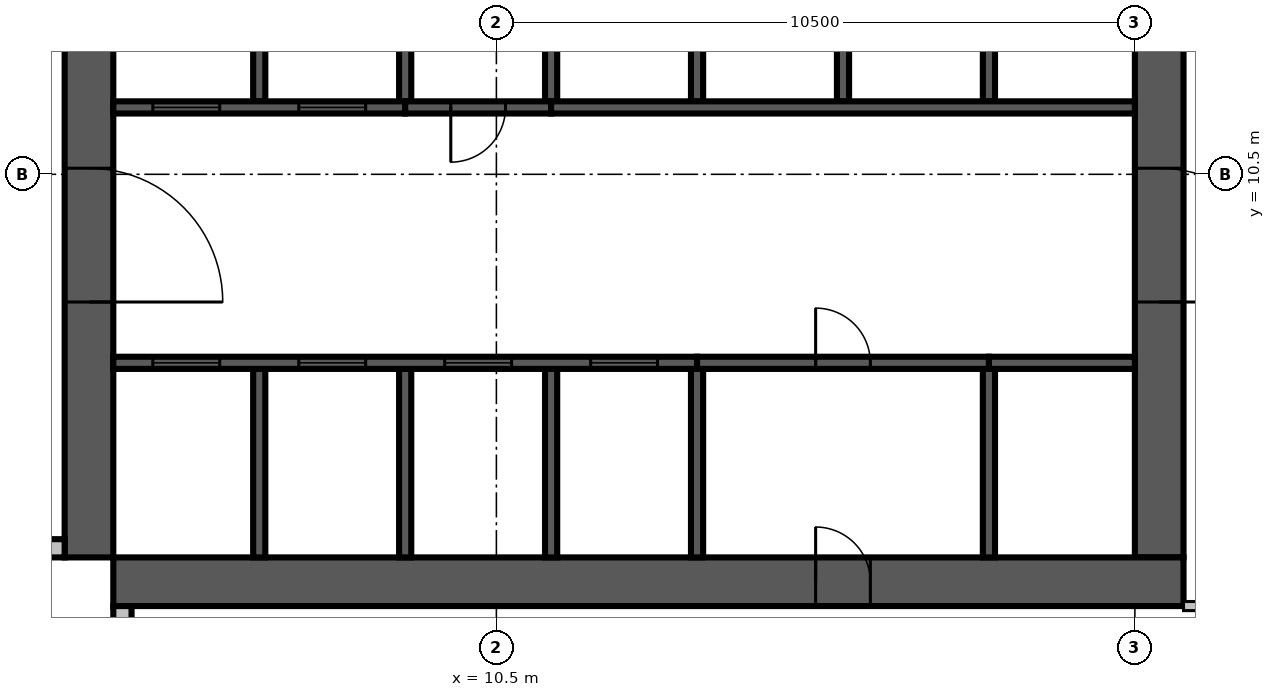
"""IFC4 building model, lengths in metres.
Left out: names, types, materials, properties, quantities, classifications, styles, units other than length and angle.
Written with IfcOpenShell. Run it as: python <this file> out.ifc"""

import sys

from ifc_helpers import new_model, si_unit, direction, frame, frame_2d, origin, place, context, subcontext, project, spatial, rectangle, extrude, source, transform, mapped, element, fill, save


model = new_model("IFC4")
c1 = context("Model", 3, precision=1e-05, world=origin(), true_north=direction((0.0, 1.0)))
c2 = subcontext(c1, "Body", "Model", "MODEL_VIEW")
j1 = project(units=[si_unit("LENGTHUNIT", "METRE"), si_unit("PLANEANGLEUNIT", "RADIAN")], contexts=[c1])
p1 = place(None, origin())
s1 = spatial("IfcSite", under=j1, at=p1, CompositionType="ELEMENT")
p2 = place(p1, origin())
s2 = spatial("IfcBuilding", under=s1, at=p2, CompositionType="ELEMENT")
p3 = place(p2, frame((0.0, 0.0, 227.2)))
s3 = spatial("IfcBuildingStorey", under=s2, at=p3, CompositionType="ELEMENT", Elevation=227.2)
m1 = source(origin(), c2, "Body", "SweptSolid", [
    extrude(rectangle(XDim=17.6, YDim=0.8, at=frame_2d((8.8, 0.0))), origin(), (0.0, 0.0, 1.0), 3.8),
])
p4 = place(p3, frame((3.8, 4.2, 0.0), z_axis=(0.0, 0.0, 1.0), x_axis=(0.0, 1.0, 0.0)))
e1 = element("IfcWall", 1, at=p4, inside=s3, PredefinedType="SHEAR", context=c2, shape_type="MappedRepresentation", body=[
    mapped(m1, transform((0.0, 0.0, 0.0), scale=1.0)),
])
m2 = source(origin(), c2, "Body", "SweptSolid", [
    extrude(rectangle(XDim=2.2, YDim=2.1, at=frame_2d((1.1, 1.05))), frame((0.0, 0.41, 0.0), z_axis=(0.0, -1.0, 0.0), x_axis=(1.0, 0.0, 0.0)), (0.0, 0.0, 1.0), 0.82),
])
p5 = place(p4, frame((4.2, 0.0, 0.0)))
e2 = element("IfcOpeningElement", 2, at=p5, cuts=e1, PredefinedType="OPENING", context=c2, shape_type="MappedRepresentation", body=[
    mapped(m2, transform((0.0, 0.0, 0.0), scale=1.0)),
])
m3 = source(origin(), c2, "Body", "SweptSolid", [
    extrude(rectangle(XDim=0.9, YDim=2.1, at=frame_2d((0.45, 1.05))), frame((0.0, 0.41, 0.0), z_axis=(0.0, -1.0, 0.0), x_axis=(1.0, 0.0, 0.0)), (0.0, 0.0, 1.0), 0.82),
])
p6 = place(p4, frame((10.95, 0.0, 0.0)))
e3 = element("IfcOpeningElement", 3, at=p6, cuts=e1, PredefinedType="OPENING", context=c2, shape_type="MappedRepresentation", body=[
    mapped(m3, transform((0.0, 0.0, 0.0), scale=1.0)),
])
m4 = source(origin(), c2, "Body", "SweptSolid", [
    extrude(rectangle(XDim=16.8, YDim=0.8, at=frame_2d((8.4, 0.0))), origin(), (0.0, 0.0, 1.0), 3.8),
])
p7 = place(p3, frame((21.4, 4.2, 0.0), z_axis=(0.0, 0.0, 1.0), x_axis=(0.0, 1.0, 0.0)))
e4 = element("IfcWall", 4, at=p7, inside=s3, PredefinedType="SHEAR", context=c2, shape_type="MappedRepresentation", body=[
    mapped(m4, transform((0.0, 0.0, 0.0), scale=1.0)),
])
p8 = place(p7, frame((4.2, 0.0, 0.0)))
e5 = element("IfcOpeningElement", 5, at=p8, cuts=e4, PredefinedType="OPENING", context=c2, shape_type="MappedRepresentation", body=[
    mapped(m2, transform((0.0, 0.0, 0.0), scale=1.0)),
])
m5 = source(origin(), c2, "Body", "SweptSolid", [
    extrude(rectangle(XDim=1.2, YDim=2.1, at=frame_2d((0.6, 1.05))), frame((0.0, 0.41, 0.0), z_axis=(0.0, -1.0, 0.0), x_axis=(1.0, 0.0, 0.0)), (0.0, 0.0, 1.0), 0.82),
])
p9 = place(p7, frame((14.7, 0.0, 0.0)))
e6 = element("IfcOpeningElement", 6, at=p9, cuts=e4, PredefinedType="OPENING", context=c2, shape_type="MappedRepresentation", body=[
    mapped(m5, transform((0.0, 0.0, 0.0), scale=1.0)),
])
p10 = place(p3, frame((4.2, 3.8, 0.0), z_axis=(0.0, 0.0, 1.0), x_axis=(1.0, 0.0, 0.0)))
e7 = element("IfcWall", 7, at=p10, inside=s3, PredefinedType="SHEAR", context=c2, shape_type="MappedRepresentation", body=[
    mapped(m1, transform((0.0, 0.0, 0.0), scale=1.0)),
])
p11 = place(p10, frame((11.55, 0.0, 0.0)))
e8 = element("IfcOpeningElement", 8, at=p11, cuts=e7, PredefinedType="OPENING", context=c2, shape_type="MappedRepresentation", body=[
    mapped(m3, transform((0.0, 0.0, 0.0), scale=1.0)),
])
m6 = source(origin(), c2, "Body", "SweptSolid", [
    extrude(rectangle(XDim=3.4, YDim=0.3, at=frame_2d((1.7, 0.0))), origin(), (0.0, 0.0, 1.0), 3.4),
])
p12 = place(p3, frame((0.0, 4.35, 0.0), z_axis=(0.0, 0.0, 1.0), x_axis=(1.0, 0.0, 0.0)))
e9 = element("IfcWall", 9, at=p12, inside=s3, PredefinedType="STANDARD", context=c2, shape_type="MappedRepresentation", body=[
    mapped(m6, transform((0.0, 0.0, 0.0), scale=1.0)),
])
m7 = source(origin(), c2, "Body", "SweptSolid", [
    extrude(rectangle(XDim=1.8, YDim=2.3, at=frame_2d((0.9, 1.15))), frame((0.0, 0.16, 0.0), z_axis=(0.0, -1.0, 0.0), x_axis=(1.0, 0.0, 0.0)), (0.0, 0.0, 1.0), 0.32),
])
p13 = place(p12, frame((1.2, 0.0, 0.6)))
e10 = element("IfcOpeningElement", 10, at=p13, cuts=e9, PredefinedType="OPENING", context=c2, shape_type="MappedRepresentation", body=[
    mapped(m7, transform((0.0, 0.0, 0.0), scale=1.0)),
])
p14 = place(p3, frame((4.35, 3.4, 0.0), z_axis=(0.0, 0.0, 1.0), x_axis=(0.0, -1.0, 0.0)))
e11 = element("IfcWall", 11, at=p14, inside=s3, PredefinedType="STANDARD", context=c2, shape_type="MappedRepresentation", body=[
    mapped(m6, transform((0.0, 0.0, 0.0), scale=1.0)),
])
p15 = place(p14, frame((0.4, 0.0, 0.6)))
e12 = element("IfcOpeningElement", 12, at=p15, cuts=e11, PredefinedType="OPENING", context=c2, shape_type="MappedRepresentation", body=[
    mapped(m7, transform((0.0, 0.0, 0.0), scale=1.0)),
])
m8 = source(origin(), c2, "Body", "SweptSolid", [
    extrude(rectangle(XDim=3.1, YDim=0.2, at=frame_2d((1.55, 0.0))), origin(), (0.0, 0.0, 1.0), 3.8),
])
for number, where, z_axis, x_axis in (
    (13, (6.6, 4.2, 0.0), (0.0, 0.0, 1.0), (0.0, 1.0, 0.0)),
    (14, (9.0, 4.2, 0.0), (0.0, 0.0, 1.0), (0.0, 1.0, 0.0)),
    (15, (11.4, 4.2, 0.0), (0.0, 0.0, 1.0), (0.0, 1.0, 0.0)),
):
    element("IfcWall", number, at=place(p3, frame(where, z_axis=z_axis, x_axis=x_axis)), inside=s3, PredefinedType="SOLIDWALL", context=c2, shape_type="MappedRepresentation", body=[
        mapped(m8, transform((0.0, 0.0, 0.0), scale=1.0)),
    ])
m9 = source(origin(), c2, "Body", "SweptSolid", [
    extrude(rectangle(XDim=3.1, YDim=0.2, at=frame_2d((1.55, 0.0))), origin(), (0.0, 0.0, 1.0), 3.4),
])
for number, where, z_axis, x_axis in (
    (16, (13.8, 4.2, 0.0), (0.0, 0.0, 1.0), (0.0, 1.0, 0.0)),
    (17, (18.6, 4.2, 0.0), (0.0, 0.0, 1.0), (0.0, 1.0, 0.0)),
):
    element("IfcWall", number, at=place(p3, frame(where, z_axis=z_axis, x_axis=x_axis)), inside=s3, PredefinedType="SOLIDWALL", context=c2, shape_type="MappedRepresentation", body=[
        mapped(m9, transform((0.0, 0.0, 0.0), scale=1.0)),
    ])
m10 = source(origin(), c2, "Body", "SweptSolid", [
    extrude(rectangle(XDim=3.0, YDim=0.2, at=frame_2d((1.5, 0.0))), origin(), (0.0, 0.0, 1.0), 3.8),
])
p16 = place(p3, frame((6.6, 11.7, 0.0), z_axis=(0.0, 0.0, 1.0), x_axis=(0.0, 1.0, 0.0)))
e18 = element("IfcWall", 18, at=p16, inside=s3, PredefinedType="SOLIDWALL", context=c2, shape_type="MappedRepresentation", body=[
    mapped(m10, transform((0.0, 0.0, 0.0), scale=1.0)),
])
m11 = source(origin(), c2, "Body", "SweptSolid", [
    extrude(rectangle(XDim=3.0, YDim=0.2, at=frame_2d((1.5, 0.0))), origin(), (0.0, 0.0, 1.0), 3.4),
])
for number, where, z_axis, x_axis in (
    (19, (9.0, 11.7, 0.0), (0.0, 0.0, 1.0), (0.0, 1.0, 0.0)),
    (20, (11.4, 11.7, 0.0), (0.0, 0.0, 1.0), (0.0, 1.0, 0.0)),
):
    element("IfcWall", number, at=place(p3, frame(where, z_axis=z_axis, x_axis=x_axis)), inside=s3, PredefinedType="SOLIDWALL", context=c2, shape_type="MappedRepresentation", body=[
        mapped(m11, transform((0.0, 0.0, 0.0), scale=1.0)),
    ])
for number, where, z_axis, x_axis in (
    (21, (13.8, 11.7, 0.0), (0.0, 0.0, 1.0), (0.0, 1.0, 0.0)),
    (22, (16.2, 11.7, 0.0), (0.0, 0.0, 1.0), (0.0, 1.0, 0.0)),
    (23, (18.6, 11.7, 0.0), (0.0, 0.0, 1.0), (0.0, 1.0, 0.0)),
):
    element("IfcWall", number, at=place(p3, frame(where, z_axis=z_axis, x_axis=x_axis)), inside=s3, PredefinedType="SOLIDWALL", context=c2, shape_type="MappedRepresentation", body=[
        mapped(m10, transform((0.0, 0.0, 0.0), scale=1.0)),
    ])
m12 = source(origin(), c2, "Body", "SweptSolid", [
    extrude(rectangle(XDim=9.6, YDim=0.2, at=frame_2d((4.8, 0.0))), origin(), (0.0, 0.0, 1.0), 3.8),
])
p17 = place(p3, frame((4.2, 7.4, 0.0), z_axis=(0.0, 0.0, 1.0), x_axis=(1.0, 0.0, 0.0)))
e24 = element("IfcWall", 24, at=p17, inside=s3, PredefinedType="SOLIDWALL", context=c2, shape_type="MappedRepresentation", body=[
    mapped(m12, transform((0.0, 0.0, 0.0), scale=1.0)),
])
m13 = source(origin(), c2, "Body", "SweptSolid", [
    extrude(rectangle(XDim=1.1, YDim=2.1, at=frame_2d((0.55, 1.05))), frame((0.0, 0.11, 0.0), z_axis=(0.0, -1.0, 0.0), x_axis=(1.0, 0.0, 0.0)), (0.0, 0.0, 1.0), 0.22),
])
p18 = place(p17, frame((0.65, 0.0, 0.0)))
e25 = element("IfcOpeningElement", 25, at=p18, cuts=e24, PredefinedType="OPENING", context=c2, shape_type="MappedRepresentation", body=[
    mapped(m13, transform((0.0, 0.0, 0.0), scale=1.0)),
])
p19 = place(p17, frame((3.05, 0.0, 0.0)))
e26 = element("IfcOpeningElement", 26, at=p19, cuts=e24, PredefinedType="OPENING", context=c2, shape_type="MappedRepresentation", body=[
    mapped(m13, transform((0.0, 0.0, 0.0), scale=1.0)),
])
p20 = place(p17, frame((5.45, 0.0, 0.0)))
e27 = element("IfcOpeningElement", 27, at=p20, cuts=e24, PredefinedType="OPENING", context=c2, shape_type="MappedRepresentation", body=[
    mapped(m13, transform((0.0, 0.0, 0.0), scale=1.0)),
])
p21 = place(p17, frame((7.85, 0.0, 0.0)))
e28 = element("IfcOpeningElement", 28, at=p21, cuts=e24, PredefinedType="OPENING", context=c2, shape_type="MappedRepresentation", body=[
    mapped(m13, transform((0.0, 0.0, 0.0), scale=1.0)),
])
m14 = source(origin(), c2, "Body", "SweptSolid", [
    extrude(rectangle(XDim=4.8, YDim=0.2, at=frame_2d((2.4, 0.0))), origin(), (0.0, 0.0, 1.0), 3.4),
])
p22 = place(p3, frame((13.8, 7.4, 0.0), z_axis=(0.0, 0.0, 1.0), x_axis=(1.0, 0.0, 0.0)))
e29 = element("IfcWall", 29, at=p22, inside=s3, PredefinedType="SOLIDWALL", context=c2, shape_type="MappedRepresentation", body=[
    mapped(m14, transform((0.0, 0.0, 0.0), scale=1.0)),
])
m15 = source(origin(), c2, "Body", "SweptSolid", [
    extrude(rectangle(XDim=0.9, YDim=2.1, at=frame_2d((0.45, 1.05))), frame((0.0, 0.11, 0.0), z_axis=(0.0, -1.0, 0.0), x_axis=(1.0, 0.0, 0.0)), (0.0, 0.0, 1.0), 0.22),
])
p23 = place(p22, frame((1.95, 0.0, 0.0)))
e30 = element("IfcOpeningElement", 30, at=p23, cuts=e29, PredefinedType="OPENING", context=c2, shape_type="MappedRepresentation", body=[
    mapped(m15, transform((0.0, 0.0, 0.0), scale=1.0)),
])
m16 = source(origin(), c2, "Body", "SweptSolid", [
    extrude(rectangle(XDim=2.4, YDim=0.2, at=frame_2d((1.2, 0.0))), origin(), (0.0, 0.0, 1.0), 3.8),
])
p24 = place(p3, frame((18.6, 7.4, 0.0), z_axis=(0.0, 0.0, 1.0), x_axis=(1.0, 0.0, 0.0)))
e31 = element("IfcWall", 31, at=p24, inside=s3, PredefinedType="SOLIDWALL", context=c2, shape_type="MappedRepresentation", body=[
    mapped(m16, transform((0.0, 0.0, 0.0), scale=1.0)),
])
m17 = source(origin(), c2, "Body", "SweptSolid", [
    extrude(rectangle(XDim=4.8, YDim=0.2, at=frame_2d((2.4, 0.0))), origin(), (0.0, 0.0, 1.0), 3.8),
])
p25 = place(p3, frame((4.2, 11.6, 0.0), z_axis=(0.0, 0.0, 1.0), x_axis=(1.0, 0.0, 0.0)))
e32 = element("IfcWall", 32, at=p25, inside=s3, PredefinedType="SOLIDWALL", context=c2, shape_type="MappedRepresentation", body=[
    mapped(m17, transform((0.0, 0.0, 0.0), scale=1.0)),
])
p26 = place(p25, frame((0.65, 0.0, 0.0)))
e33 = element("IfcOpeningElement", 33, at=p26, cuts=e32, PredefinedType="OPENING", context=c2, shape_type="MappedRepresentation", body=[
    mapped(m13, transform((0.0, 0.0, 0.0), scale=1.0)),
])
p27 = place(p25, frame((3.05, 0.0, 0.0)))
e34 = element("IfcOpeningElement", 34, at=p27, cuts=e32, PredefinedType="OPENING", context=c2, shape_type="MappedRepresentation", body=[
    mapped(m13, transform((0.0, 0.0, 0.0), scale=1.0)),
])
m18 = source(origin(), c2, "Body", "SweptSolid", [
    extrude(rectangle(XDim=2.4, YDim=0.2, at=frame_2d((1.2, 0.0))), origin(), (0.0, 0.0, 1.0), 3.4),
])
p28 = place(p3, frame((9.0, 11.6, 0.0), z_axis=(0.0, 0.0, 1.0), x_axis=(1.0, 0.0, 0.0)))
e35 = element("IfcWall", 35, at=p28, inside=s3, PredefinedType="SOLIDWALL", context=c2, shape_type="MappedRepresentation", body=[
    mapped(m18, transform((0.0, 0.0, 0.0), scale=1.0)),
])
p29 = place(p28, frame((0.75, 0.0, 0.0)))
e36 = element("IfcOpeningElement", 36, at=p29, cuts=e35, PredefinedType="OPENING", context=c2, shape_type="MappedRepresentation", body=[
    mapped(m15, transform((0.0, 0.0, 0.0), scale=1.0)),
])
p30 = place(p3, frame((11.4, 11.6, 0.0), z_axis=(0.0, 0.0, 1.0), x_axis=(1.0, 0.0, 0.0)))
e37 = element("IfcWall", 37, at=p30, inside=s3, PredefinedType="SOLIDWALL", context=c2, shape_type="MappedRepresentation", body=[
    mapped(m12, transform((0.0, 0.0, 0.0), scale=1.0)),
])
m19 = source(origin(), c2, "Body", "SweptSolid", [
    extrude(rectangle(XDim=7.525, YDim=0.15, at=frame_2d((3.763, 0.0))), origin(), (0.0, 0.0, 1.0), 2.9),
])
p31 = place(p3, frame((21.8, 3.4, 0.0), z_axis=(0.0, 0.0, 1.0), x_axis=(1.0, 0.0, 0.0)))
e38 = element("IfcWall", 38, at=p31, inside=s3, PredefinedType="PARTITIONING", context=c2, shape_type="MappedRepresentation", body=[
    mapped(m19, transform((0.0, 0.0, 0.0), scale=1.0)),
])
m20 = source(origin(), c2, "Body", "SweptSolid", [
    extrude(rectangle(XDim=1.0, YDim=2.1, at=frame_2d((0.5, 1.05))), frame((0.0, 0.085, 0.0), z_axis=(0.0, -1.0, 0.0), x_axis=(1.0, 0.0, 0.0)), (0.0, 0.0, 1.0), 0.17),
])
p32 = place(p31, frame((3.6, 0.0, 0.0)))
e39 = element("IfcOpeningElement", 39, at=p32, cuts=e38, PredefinedType="OPENING", context=c2, shape_type="MappedRepresentation", body=[
    mapped(m20, transform((0.0, 0.0, 0.0), scale=1.0)),
])
m21 = source(origin(), c2, "Body", "SweptSolid", [
    extrude(rectangle(XDim=0.9, YDim=2.1, at=frame_2d((0.45, 1.05))), frame((0.0, 0.085, 0.0), z_axis=(0.0, -1.0, 0.0), x_axis=(1.0, 0.0, 0.0)), (0.0, 0.0, 1.0), 0.17),
])
p33 = place(p31, frame((2.312, 0.0, 0.0)))
e40 = element("IfcOpeningElement", 40, at=p33, cuts=e38, PredefinedType="OPENING", context=c2, shape_type="MappedRepresentation", body=[
    mapped(m21, transform((0.0, 0.0, 0.0), scale=1.0)),
])
m22 = source(origin(), c2, "Body", "SweptSolid", [
    extrude(rectangle(XDim=1.1, YDim=2.1, at=frame_2d((0.55, 1.05))), frame((0.0, 0.025, 0.0), z_axis=(0.0, -1.0, 0.0), x_axis=(1.0, 0.0, 0.0)), (0.0, 0.0, 1.0), 0.05),
])
p34 = place(p18, origin())
e41 = element("IfcDoor", 41, at=p34, inside=s3, OperationType="SLIDING_TO_LEFT", PredefinedType="DOOR", context=c2, shape_type="MappedRepresentation", body=[
    mapped(m22, transform((0.0, 0.0, 0.0), scale=1.0)),
])
fill(e25, e41)
p35 = place(p19, origin())
e42 = element("IfcDoor", 42, at=p35, inside=s3, OperationType="SLIDING_TO_LEFT", PredefinedType="DOOR", context=c2, shape_type="MappedRepresentation", body=[
    mapped(m22, transform((0.0, 0.0, 0.0), scale=1.0)),
])
fill(e26, e42)
p36 = place(p20, origin())
e43 = element("IfcDoor", 43, at=p36, inside=s3, OperationType="SLIDING_TO_LEFT", PredefinedType="DOOR", context=c2, shape_type="MappedRepresentation", body=[
    mapped(m22, transform((0.0, 0.0, 0.0), scale=1.0)),
])
fill(e27, e43)
p37 = place(p21, origin())
e44 = element("IfcDoor", 44, at=p37, inside=s3, OperationType="SLIDING_TO_LEFT", PredefinedType="DOOR", context=c2, shape_type="MappedRepresentation", body=[
    mapped(m22, transform((0.0, 0.0, 0.0), scale=1.0)),
])
fill(e28, e44)
m23 = source(origin(), c2, "Body", "SweptSolid", [
    extrude(rectangle(XDim=0.9, YDim=2.1, at=frame_2d((0.45, 1.05))), frame((0.0, 0.025, 0.0), z_axis=(0.0, -1.0, 0.0), x_axis=(1.0, 0.0, 0.0)), (0.0, 0.0, 1.0), 0.05),
])
p38 = place(p23, origin())
e45 = element("IfcDoor", 45, at=p38, inside=s3, OperationType="SINGLE_SWING_LEFT", PredefinedType="DOOR", context=c2, shape_type="MappedRepresentation", body=[
    mapped(m23, transform((0.0, 0.0, 0.0), scale=1.0)),
])
fill(e30, e45)
p39 = place(p26, origin())
e46 = element("IfcDoor", 46, at=p39, inside=s3, OperationType="SLIDING_TO_LEFT", PredefinedType="DOOR", context=c2, shape_type="MappedRepresentation", body=[
    mapped(m22, transform((0.0, 0.0, 0.0), scale=1.0)),
])
fill(e33, e46)
p40 = place(p27, origin())
e47 = element("IfcDoor", 47, at=p40, inside=s3, OperationType="SLIDING_TO_LEFT", PredefinedType="DOOR", context=c2, shape_type="MappedRepresentation", body=[
    mapped(m22, transform((0.0, 0.0, 0.0), scale=1.0)),
])
fill(e34, e47)
p41 = place(p29, origin())
e48 = element("IfcDoor", 48, at=p41, inside=s3, OperationType="SINGLE_SWING_RIGHT", PredefinedType="DOOR", context=c2, shape_type="MappedRepresentation", body=[
    mapped(m23, transform((0.0, 0.0, 0.0), scale=1.0)),
])
fill(e36, e48)
m24 = source(origin(), c2, "Body", "SweptSolid", [
    extrude(rectangle(XDim=2.2, YDim=2.1, at=frame_2d((1.1, 1.05))), frame((0.0, 0.025, 0.0), z_axis=(0.0, -1.0, 0.0), x_axis=(1.0, 0.0, 0.0)), (0.0, 0.0, 1.0), 0.05),
])
p42 = place(p8, origin())
e49 = element("IfcDoor", 49, at=p42, inside=s3, OperationType="DOUBLE_DOOR_SINGLE_SWING", PredefinedType="DOOR", context=c2, shape_type="MappedRepresentation", body=[
    mapped(m24, transform((0.0, 0.0, 0.0), scale=1.0)),
])
fill(e5, e49)
p43 = place(p5, origin())
e50 = element("IfcDoor", 50, at=p43, inside=s3, OperationType="DOUBLE_DOOR_SINGLE_SWING", PredefinedType="DOOR", context=c2, shape_type="MappedRepresentation", body=[
    mapped(m24, transform((0.0, 0.0, 0.0), scale=1.0)),
])
fill(e2, e50)
p44 = place(p11, origin())
e51 = element("IfcDoor", 51, at=p44, inside=s3, OperationType="SINGLE_SWING_LEFT", PredefinedType="DOOR", context=c2, shape_type="MappedRepresentation", body=[
    mapped(m23, transform((0.0, 0.0, 0.0), scale=1.0)),
])
fill(e8, e51)
save(model, sys.argv[1])
